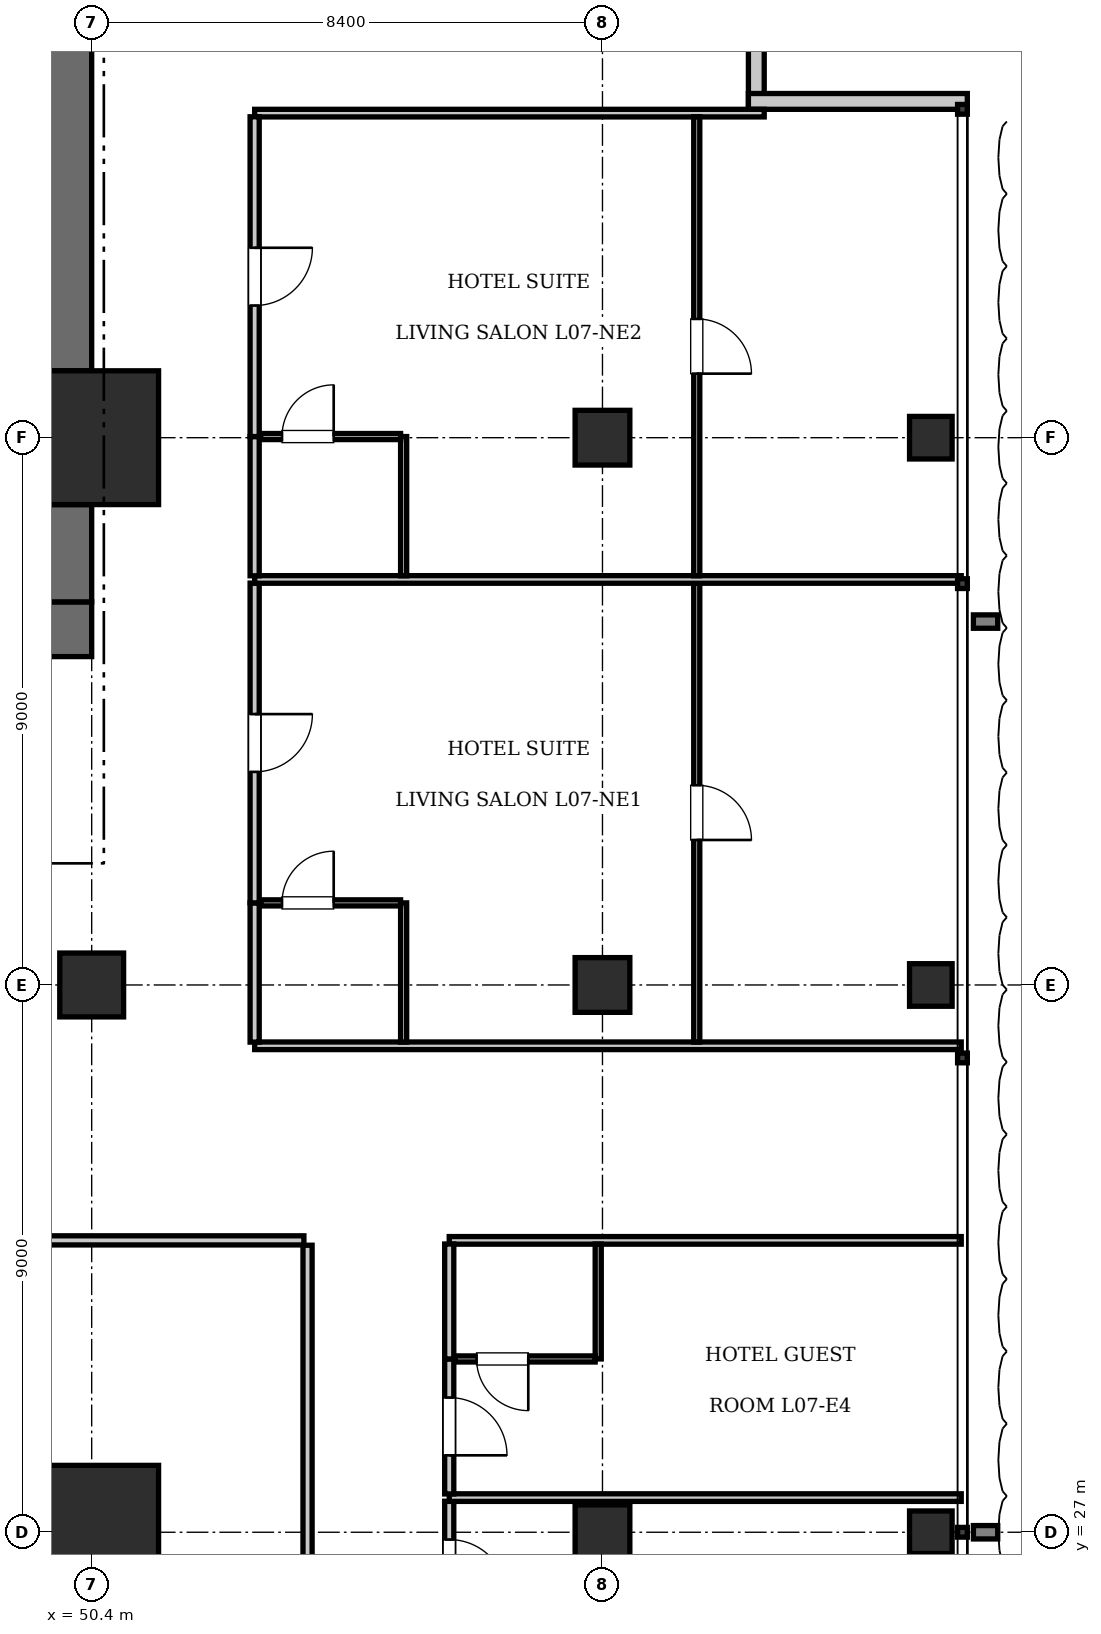
"""IFC4 building model, lengths in metres.
Left out: names, types, materials, properties, quantities, classifications, styles, units other than length and angle.
Written with IfcOpenShell. Run it as: python <this file> out.ifc"""

import sys

from ifc_helpers import new_model, si_unit, direction, frame, frame_2d, origin, origin_2d, place, context, subcontext, project, spatial, rectangle, i_section, extrude, element, fill, save


model = new_model("IFC4")
c1 = context("Model", 3, precision=1e-05, world=origin(), true_north=direction((0.0, 1.0)))
c2 = subcontext(c1, "Body", "Model", "MODEL_VIEW")
j1 = project(units=[si_unit("LENGTHUNIT", "METRE"), si_unit("PLANEANGLEUNIT", "RADIAN")], contexts=[c1])
p1 = place(None, origin())
s1 = spatial("IfcSite", under=j1, at=p1, CompositionType="ELEMENT")
p2 = place(p1, origin())
s2 = spatial("IfcBuilding", under=s1, at=p2, CompositionType="ELEMENT")
p3 = place(p2, frame((0.0, 0.0, 34.65)))
s3 = spatial("IfcBuildingStorey", under=s2, at=p3, CompositionType="ELEMENT", Elevation=34.65)
for number, where, z_axis, x_axis in (
    (1, (50.4, 27.0, 0.0), (0.0, 0.0, 1.0), (1.0, 0.0, 0.0)),
    (2, (50.4, 45.0, 0.0), (0.0, 0.0, 1.0), (1.0, 0.0, 0.0)),
):
    element("IfcColumn", number, at=place(p3, frame(where, z_axis=z_axis, x_axis=x_axis)), inside=s3, PredefinedType="COLUMN", context=c2, shape_type="SweptSolid", body=[
        extrude(rectangle(XDim=2.2, YDim=2.2, at=origin_2d()), origin(), (0.0, 0.0, 1.0), 3.85),
    ])
p4 = place(p3, frame((43.6, 41.85, 0.0), z_axis=(0.0, 0.0, 1.0), x_axis=(1.0, 0.0, 0.0)))
e3 = element("IfcWall", 3, at=p4, inside=s3, PredefinedType="SHEAR", context=c2, shape_type="SweptSolid", body=[
    extrude(rectangle(XDim=6.8, YDim=0.9, at=frame_2d((3.4, 0.0))), origin(), (0.0, 0.0, 1.0), 3.85),
])
p5 = place(p4, frame((3.9, 0.0, 0.0)))
e4 = element("IfcOpeningElement", 4, at=p5, cuts=e3, PredefinedType="OPENING", context=c2, shape_type="SweptSolid", body=[
    extrude(rectangle(XDim=1.15, YDim=2.15, at=frame_2d((0.575, 1.075))), frame((0.0, 0.46, 0.0), z_axis=(0.0, -1.0, 0.0), x_axis=(1.0, 0.0, 0.0)), (0.0, 0.0, 1.0), 0.92),
])
p6 = place(p4, frame((0.55, 0.0, 0.0)))
e5 = element("IfcOpeningElement", 5, at=p6, cuts=e3, PredefinedType="OPENING", context=c2, shape_type="SweptSolid", body=[
    extrude(rectangle(XDim=1.1, YDim=2.2, at=frame_2d((0.55, 1.1))), frame((0.0, 0.46, 0.0), z_axis=(0.0, -1.0, 0.0), x_axis=(1.0, 0.0, 0.0)), (0.0, 0.0, 1.0), 0.92),
])
p7 = place(p3, frame((49.95, 42.3, 0.0), z_axis=(0.0, 0.0, 1.0), x_axis=(0.0, 1.0, 0.0)))
e6 = element("IfcWall", 6, at=p7, inside=s3, PredefinedType="SHEAR", context=c2, shape_type="SweptSolid", body=[
    extrude(rectangle(XDim=1.6, YDim=0.9, at=frame_2d((0.8, 0.0))), origin(), (0.0, 0.0, 1.0), 3.85),
])
p8 = place(p3, frame((49.95, 46.1, 0.0), z_axis=(0.0, 0.0, 1.0), x_axis=(0.0, 1.0, 0.0)))
e7 = element("IfcWall", 7, at=p8, inside=s3, PredefinedType="SHEAR", context=c2, shape_type="SweptSolid", body=[
    extrude(rectangle(XDim=7.0, YDim=0.9, at=frame_2d((3.5, 0.0))), origin(), (0.0, 0.0, 1.0), 3.85),
])
p9 = place(p3, frame((50.4, 36.0, 0.0), z_axis=(0.0, 0.0, 1.0), x_axis=(1.0, 0.0, 0.0)))
e8 = element("IfcColumn", 8, at=p9, inside=s3, PredefinedType="COLUMN", context=c2, shape_type="SweptSolid", body=[
    extrude(rectangle(XDim=1.05, YDim=1.05, at=origin_2d()), origin(), (0.0, 0.0, 1.0), 3.85),
])
for number, where, z_axis, x_axis in (
    (9, (58.8, 27.0, 0.0), (0.0, 0.0, 1.0), (1.0, 0.0, 0.0)),
    (10, (58.8, 36.0, 0.0), (0.0, 0.0, 1.0), (1.0, 0.0, 0.0)),
    (11, (58.8, 45.0, 0.0), (0.0, 0.0, 1.0), (1.0, 0.0, 0.0)),
):
    element("IfcColumn", number, at=place(p3, frame(where, z_axis=z_axis, x_axis=x_axis)), inside=s3, PredefinedType="COLUMN", context=c2, shape_type="SweptSolid", body=[
        extrude(rectangle(XDim=0.9, YDim=0.9, at=origin_2d()), origin(), (0.0, 0.0, 1.0), 3.85),
    ])
for number, where, z_axis, x_axis in (
    (12, (64.2, 27.0, 0.0), (0.0, 0.0, 1.0), (1.0, 0.0, 0.0)),
    (13, (64.2, 36.0, 0.0), (0.0, 0.0, 1.0), (1.0, 0.0, 0.0)),
    (14, (64.2, 45.0, 0.0), (0.0, 0.0, 1.0), (1.0, 0.0, 0.0)),
):
    element("IfcColumn", number, at=place(p3, frame(where, z_axis=z_axis, x_axis=x_axis)), inside=s3, PredefinedType="COLUMN", context=c2, shape_type="SweptSolid", body=[
        extrude(i_section(OverallWidth=0.7, OverallDepth=0.7, WebThickness=0.028, FlangeThickness=0.044, at=origin_2d()), origin(), (0.0, 0.0, 1.0), 3.85),
    ])
for number, where, z_axis, x_axis in (
    (15, (61.33, 54.0, 0.0), (0.0, 0.0, 1.0), (0.0, -1.0, 0.0)),
    (16, (61.2, 50.53, 0.0), (0.0, 0.0, 1.0), (1.0, 0.0, 0.0)),
):
    element("IfcWall", number, at=place(p3, frame(where, z_axis=z_axis, x_axis=x_axis)), inside=s3, PredefinedType="SOLIDWALL", context=c2, shape_type="SweptSolid", body=[
        extrude(rectangle(XDim=3.6, YDim=0.26, at=frame_2d((1.8, 0.0))), origin(), (0.0, 0.0, 1.0), 3.61),
    ])
p10 = place(p3, frame((53.95, 23.48, 0.0), z_axis=(0.0, 0.0, 1.0), x_axis=(0.0, 1.0, 0.0)))
e17 = element("IfcWall", 17, at=p10, inside=s3, PredefinedType="PARTITIONING", context=c2, shape_type="SweptSolid", body=[
    extrude(rectangle(XDim=8.24, YDim=0.15, at=frame_2d((4.12, 0.0))), origin(), (0.0, 0.0, 1.0), 3.61),
])
p11 = place(p3, frame((42.998, 31.8, 0.0), z_axis=(0.0, 0.0, 1.0), x_axis=(1.0, 0.0, 0.0)))
e18 = element("IfcWall", 18, at=p11, inside=s3, PredefinedType="PARTITIONING", context=c2, shape_type="SweptSolid", body=[
    extrude(rectangle(XDim=10.892, YDim=0.15, at=frame_2d((5.446, 0.0))), origin(), (0.0, 0.0, 1.0), 3.61),
])
p12 = place(p11, frame((4.996, 0.0, 0.0)))
e19 = element("IfcOpeningElement", 19, at=p12, cuts=e18, PredefinedType="OPENING", context=c2, shape_type="SweptSolid", body=[
    extrude(rectangle(XDim=0.9, YDim=2.1, at=frame_2d((0.45, 1.05))), frame((0.0, 0.085, 0.0), z_axis=(0.0, -1.0, 0.0), x_axis=(1.0, 0.0, 0.0)), (0.0, 0.0, 1.0), 0.17),
])
p13 = place(p3, frame((56.28, 31.8, 0.0), z_axis=(0.0, 0.0, 1.0), x_axis=(1.0, 0.0, 0.0)))
e20 = element("IfcWall", 20, at=p13, inside=s3, PredefinedType="PARTITIONING", context=c2, shape_type="SweptSolid", body=[
    extrude(rectangle(XDim=8.42, YDim=0.125, at=frame_2d((4.21, 0.0))), origin(), (0.0, 0.0, 1.0), 3.61),
])
p14 = place(p3, frame((56.28, 25.3, 0.0), z_axis=(0.0, 0.0, 1.0), x_axis=(0.0, 1.0, 0.0)))
e21 = element("IfcWall", 21, at=p14, inside=s3, PredefinedType="PARTITIONING", context=c2, shape_type="SweptSolid", body=[
    extrude(rectangle(XDim=2.21, YDim=0.15, at=frame_2d((1.105, 0.0))), origin(), (0.0, 0.0, 1.0), 3.61),
])
p15 = place(p14, frame((0.63, 0.0, 0.0)))
e22 = element("IfcOpeningElement", 22, at=p15, cuts=e21, PredefinedType="OPENING", context=c2, shape_type="SweptSolid", body=[
    extrude(rectangle(XDim=0.95, YDim=2.15, at=frame_2d((0.475, 1.075))), frame((0.0, 0.085, 0.0), z_axis=(0.0, -1.0, 0.0), x_axis=(1.0, 0.0, 0.0)), (0.0, 0.0, 1.0), 0.17),
])
p16 = place(p3, frame((56.28, 27.57, 0.0), z_axis=(0.0, 0.0, 1.0), x_axis=(1.0, 0.0, 0.0)))
e23 = element("IfcWall", 23, at=p16, inside=s3, PredefinedType="PARTITIONING", context=c2, shape_type="SweptSolid", body=[
    extrude(rectangle(XDim=8.42, YDim=0.125, at=frame_2d((4.21, 0.0))), origin(), (0.0, 0.0, 1.0), 3.61),
])
p17 = place(p3, frame((56.28, 27.63, 0.0), z_axis=(0.0, 0.0, 1.0), x_axis=(0.0, 1.0, 0.0)))
e24 = element("IfcWall", 24, at=p17, inside=s3, PredefinedType="PARTITIONING", context=c2, shape_type="SweptSolid", body=[
    extrude(rectangle(XDim=2.22, YDim=0.15, at=frame_2d((1.11, 0.0))), origin(), (0.0, 0.0, 1.0), 3.61),
])
p18 = place(p17, frame((0.635, 0.0, 0.0)))
e25 = element("IfcOpeningElement", 25, at=p18, cuts=e24, PredefinedType="OPENING", context=c2, shape_type="SweptSolid", body=[
    extrude(rectangle(XDim=0.95, YDim=2.15, at=frame_2d((0.475, 1.075))), frame((0.0, 0.085, 0.0), z_axis=(0.0, -1.0, 0.0), x_axis=(1.0, 0.0, 0.0)), (0.0, 0.0, 1.0), 0.17),
])
p19 = place(p3, frame((56.28, 29.85, 0.0), z_axis=(0.0, 0.0, 1.0), x_axis=(0.0, 1.0, 0.0)))
e26 = element("IfcWall", 26, at=p19, inside=s3, PredefinedType="PARTITIONING", context=c2, shape_type="SweptSolid", body=[
    extrude(rectangle(XDim=1.89, YDim=0.15, at=frame_2d((0.945, 0.0))), origin(), (0.0, 0.0, 1.0), 3.61),
])
p20 = place(p3, frame((58.73, 29.85, 0.0), z_axis=(0.0, 0.0, 1.0), x_axis=(0.0, 1.0, 0.0)))
e27 = element("IfcWall", 27, at=p20, inside=s3, PredefinedType="PARTITIONING", context=c2, shape_type="SweptSolid", body=[
    extrude(rectangle(XDim=1.89, YDim=0.1, at=frame_2d((0.945, 0.0))), origin(), (0.0, 0.0, 1.0), 2.988),
])
p21 = place(p3, frame((56.38, 29.85, 0.0), z_axis=(0.0, 0.0, 1.0), x_axis=(1.0, 0.0, 0.0)))
e28 = element("IfcWall", 28, at=p21, inside=s3, PredefinedType="PARTITIONING", context=c2, shape_type="SweptSolid", body=[
    extrude(rectangle(XDim=2.3, YDim=0.1, at=frame_2d((1.15, 0.0))), origin(), (0.0, 0.0, 1.0), 3.61),
])
p22 = place(p21, frame((0.35, 0.0, 0.0)))
e29 = element("IfcOpeningElement", 29, at=p22, cuts=e28, PredefinedType="OPENING", context=c2, shape_type="SweptSolid", body=[
    extrude(rectangle(XDim=0.85, YDim=2.1, at=frame_2d((0.425, 1.05))), frame((0.0, 0.06, 0.0), z_axis=(0.0, -1.0, 0.0), x_axis=(1.0, 0.0, 0.0)), (0.0, 0.0, 1.0), 0.12),
])
p23 = place(p3, frame((53.08, 35.0, 0.0), z_axis=(0.0, 0.0, 1.0), x_axis=(1.0, 0.0, 0.0)))
e30 = element("IfcWall", 30, at=p23, inside=s3, PredefinedType="PARTITIONING", context=c2, shape_type="SweptSolid", body=[
    extrude(rectangle(XDim=11.62, YDim=0.125, at=frame_2d((5.81, 0.0))), origin(), (0.0, 0.0, 1.0), 3.61),
])
p24 = place(p3, frame((53.08, 50.337, 0.0), z_axis=(0.0, 0.0, 1.0), x_axis=(1.0, 0.0, 0.0)))
e31 = element("IfcWall", 31, at=p24, inside=s3, PredefinedType="PARTITIONING", context=c2, shape_type="SweptSolid", body=[
    extrude(rectangle(XDim=8.38, YDim=0.125, at=frame_2d((4.19, 0.0))), origin(), (0.0, 0.0, 1.0), 3.61),
])
p25 = place(p3, frame((53.08, 35.06, 0.0), z_axis=(0.0, 0.0, 1.0), x_axis=(0.0, 1.0, 0.0)))
e32 = element("IfcWall", 32, at=p25, inside=s3, PredefinedType="PARTITIONING", context=c2, shape_type="SweptSolid", body=[
    extrude(rectangle(XDim=2.29, YDim=0.15, at=frame_2d((1.145, 0.0))), origin(), (0.0, 0.0, 1.0), 3.61),
])
p26 = place(p3, frame((53.08, 37.35, 0.0), z_axis=(0.0, 0.0, 1.0), x_axis=(0.0, 1.0, 0.0)))
e33 = element("IfcWall", 33, at=p26, inside=s3, PredefinedType="PARTITIONING", context=c2, shape_type="SweptSolid", body=[
    extrude(rectangle(XDim=5.259, YDim=0.15, at=frame_2d((2.629, 0.0))), origin(), (0.0, 0.0, 1.0), 3.61),
])
p27 = place(p26, frame((2.154, 0.0, 0.0)))
e34 = element("IfcOpeningElement", 34, at=p27, cuts=e33, PredefinedType="OPENING", context=c2, shape_type="SweptSolid", body=[
    extrude(rectangle(XDim=0.95, YDim=2.15, at=frame_2d((0.475, 1.075))), frame((0.0, 0.085, 0.0), z_axis=(0.0, -1.0, 0.0), x_axis=(1.0, 0.0, 0.0)), (0.0, 0.0, 1.0), 0.17),
])
p28 = place(p3, frame((55.53, 35.06, 0.0), z_axis=(0.0, 0.0, 1.0), x_axis=(0.0, 1.0, 0.0)))
e35 = element("IfcWall", 35, at=p28, inside=s3, PredefinedType="PARTITIONING", context=c2, shape_type="SweptSolid", body=[
    extrude(rectangle(XDim=2.29, YDim=0.1, at=frame_2d((1.145, 0.0))), origin(), (0.0, 0.0, 1.0), 3.61),
])
p29 = place(p3, frame((53.18, 37.35, 0.0), z_axis=(0.0, 0.0, 1.0), x_axis=(1.0, 0.0, 0.0)))
e36 = element("IfcWall", 36, at=p29, inside=s3, PredefinedType="PARTITIONING", context=c2, shape_type="SweptSolid", body=[
    extrude(rectangle(XDim=2.3, YDim=0.1, at=frame_2d((1.15, 0.0))), origin(), (0.0, 0.0, 1.0), 3.61),
])
p30 = place(p29, frame((0.35, 0.0, 0.0)))
e37 = element("IfcOpeningElement", 37, at=p30, cuts=e36, PredefinedType="OPENING", context=c2, shape_type="SweptSolid", body=[
    extrude(rectangle(XDim=0.85, YDim=2.1, at=frame_2d((0.425, 1.05))), frame((0.0, 0.06, 0.0), z_axis=(0.0, -1.0, 0.0), x_axis=(1.0, 0.0, 0.0)), (0.0, 0.0, 1.0), 0.12),
])
p31 = place(p3, frame((60.35, 35.06, 0.0), z_axis=(0.0, 0.0, 1.0), x_axis=(0.0, 1.0, 0.0)))
e38 = element("IfcWall", 38, at=p31, inside=s3, PredefinedType="PARTITIONING", context=c2, shape_type="SweptSolid", body=[
    extrude(rectangle(XDim=7.549, YDim=0.1, at=frame_2d((3.774, 0.0))), origin(), (0.0, 0.0, 1.0), 3.61),
])
p32 = place(p31, frame((3.324, 0.0, 0.0)))
e39 = element("IfcOpeningElement", 39, at=p32, cuts=e38, PredefinedType="OPENING", context=c2, shape_type="SweptSolid", body=[
    extrude(rectangle(XDim=0.9, YDim=2.1, at=frame_2d((0.45, 1.05))), frame((0.0, 0.06, 0.0), z_axis=(0.0, -1.0, 0.0), x_axis=(1.0, 0.0, 0.0)), (0.0, 0.0, 1.0), 0.12),
])
p33 = place(p3, frame((53.08, 42.669, 0.0), z_axis=(0.0, 0.0, 1.0), x_axis=(1.0, 0.0, 0.0)))
e40 = element("IfcWall", 40, at=p33, inside=s3, PredefinedType="PARTITIONING", context=c2, shape_type="SweptSolid", body=[
    extrude(rectangle(XDim=11.62, YDim=0.125, at=frame_2d((5.81, 0.0))), origin(), (0.0, 0.0, 1.0), 3.61),
])
p34 = place(p3, frame((53.08, 42.729, 0.0), z_axis=(0.0, 0.0, 1.0), x_axis=(0.0, 1.0, 0.0)))
e41 = element("IfcWall", 41, at=p34, inside=s3, PredefinedType="PARTITIONING", context=c2, shape_type="SweptSolid", body=[
    extrude(rectangle(XDim=2.29, YDim=0.15, at=frame_2d((1.145, 0.0))), origin(), (0.0, 0.0, 1.0), 3.61),
])
p35 = place(p3, frame((53.08, 45.019, 0.0), z_axis=(0.0, 0.0, 1.0), x_axis=(0.0, 1.0, 0.0)))
e42 = element("IfcWall", 42, at=p35, inside=s3, PredefinedType="PARTITIONING", context=c2, shape_type="SweptSolid", body=[
    extrude(rectangle(XDim=5.259, YDim=0.15, at=frame_2d((2.629, 0.0))), origin(), (0.0, 0.0, 1.0), 3.61),
])
p36 = place(p35, frame((2.154, 0.0, 0.0)))
e43 = element("IfcOpeningElement", 43, at=p36, cuts=e42, PredefinedType="OPENING", context=c2, shape_type="SweptSolid", body=[
    extrude(rectangle(XDim=0.95, YDim=2.15, at=frame_2d((0.475, 1.075))), frame((0.0, 0.085, 0.0), z_axis=(0.0, -1.0, 0.0), x_axis=(1.0, 0.0, 0.0)), (0.0, 0.0, 1.0), 0.17),
])
p37 = place(p3, frame((55.53, 42.729, 0.0), z_axis=(0.0, 0.0, 1.0), x_axis=(0.0, 1.0, 0.0)))
e44 = element("IfcWall", 44, at=p37, inside=s3, PredefinedType="PARTITIONING", context=c2, shape_type="SweptSolid", body=[
    extrude(rectangle(XDim=2.29, YDim=0.1, at=frame_2d((1.145, 0.0))), origin(), (0.0, 0.0, 1.0), 3.61),
])
p38 = place(p3, frame((53.18, 45.019, 0.0), z_axis=(0.0, 0.0, 1.0), x_axis=(1.0, 0.0, 0.0)))
e45 = element("IfcWall", 45, at=p38, inside=s3, PredefinedType="PARTITIONING", context=c2, shape_type="SweptSolid", body=[
    extrude(rectangle(XDim=2.3, YDim=0.1, at=frame_2d((1.15, 0.0))), origin(), (0.0, 0.0, 1.0), 2.988),
])
p39 = place(p38, frame((0.35, 0.0, 0.0)))
e46 = element("IfcOpeningElement", 46, at=p39, cuts=e45, PredefinedType="OPENING", context=c2, shape_type="SweptSolid", body=[
    extrude(rectangle(XDim=0.85, YDim=2.1, at=frame_2d((0.425, 1.05))), frame((0.0, 0.06, 0.0), z_axis=(0.0, -1.0, 0.0), x_axis=(1.0, 0.0, 0.0)), (0.0, 0.0, 1.0), 0.12),
])
p40 = place(p3, frame((60.35, 42.729, 0.0), z_axis=(0.0, 0.0, 1.0), x_axis=(0.0, 1.0, 0.0)))
e47 = element("IfcWall", 47, at=p40, inside=s3, PredefinedType="PARTITIONING", context=c2, shape_type="SweptSolid", body=[
    extrude(rectangle(XDim=7.549, YDim=0.1, at=frame_2d((3.774, 0.0))), origin(), (0.0, 0.0, 1.0), 3.61),
])
p41 = place(p40, frame((3.324, 0.0, 0.0)))
e48 = element("IfcOpeningElement", 48, at=p41, cuts=e47, PredefinedType="OPENING", context=c2, shape_type="SweptSolid", body=[
    extrude(rectangle(XDim=0.9, YDim=2.1, at=frame_2d((0.45, 1.05))), frame((0.0, 0.06, 0.0), z_axis=(0.0, -1.0, 0.0), x_axis=(1.0, 0.0, 0.0)), (0.0, 0.0, 1.0), 0.12),
])
p42 = place(p15, frame((0.95, 0.0, 0.0), z_axis=(0.0, 0.0, 1.0), x_axis=(-1.0, 0.0, 0.0)))
e49 = element("IfcDoor", 49, at=p42, inside=s3, OperationType="SINGLE_SWING_RIGHT", PredefinedType="DOOR", context=c2, shape_type="SweptSolid", body=[
    extrude(rectangle(XDim=0.95, YDim=2.15, at=frame_2d((0.475, 1.075))), frame((0.0, 0.025, 0.0), z_axis=(0.0, -1.0, 0.0), x_axis=(1.0, 0.0, 0.0)), (0.0, 0.0, 1.0), 0.05),
])
fill(e22, e49)
p43 = place(p22, frame((0.85, 0.0, 0.0), z_axis=(0.0, 0.0, 1.0), x_axis=(-1.0, 0.0, 0.0)))
e50 = element("IfcDoor", 50, at=p43, inside=s3, OperationType="SINGLE_SWING_LEFT", PredefinedType="DOOR", context=c2, shape_type="SweptSolid", body=[
    extrude(rectangle(XDim=0.85, YDim=2.1, at=frame_2d((0.425, 1.05))), frame((0.0, 0.025, 0.0), z_axis=(0.0, -1.0, 0.0), x_axis=(1.0, 0.0, 0.0)), (0.0, 0.0, 1.0), 0.05),
])
fill(e29, e50)
p44 = place(p18, frame((0.95, 0.0, 0.0), z_axis=(0.0, 0.0, 1.0), x_axis=(-1.0, 0.0, 0.0)))
e51 = element("IfcDoor", 51, at=p44, inside=s3, OperationType="SINGLE_SWING_RIGHT", PredefinedType="DOOR", context=c2, shape_type="SweptSolid", body=[
    extrude(rectangle(XDim=0.95, YDim=2.15, at=frame_2d((0.475, 1.075))), frame((0.0, 0.025, 0.0), z_axis=(0.0, -1.0, 0.0), x_axis=(1.0, 0.0, 0.0)), (0.0, 0.0, 1.0), 0.05),
])
fill(e25, e51)
p45 = place(p30, origin())
e52 = element("IfcDoor", 52, at=p45, inside=s3, OperationType="SINGLE_SWING_RIGHT", PredefinedType="DOOR", context=c2, shape_type="SweptSolid", body=[
    extrude(rectangle(XDim=0.85, YDim=2.1, at=frame_2d((0.425, 1.05))), frame((0.0, 0.025, 0.0), z_axis=(0.0, -1.0, 0.0), x_axis=(1.0, 0.0, 0.0)), (0.0, 0.0, 1.0), 0.05),
])
fill(e37, e52)
p46 = place(p27, frame((0.95, 0.0, 0.0), z_axis=(0.0, 0.0, 1.0), x_axis=(-1.0, 0.0, 0.0)))
e53 = element("IfcDoor", 53, at=p46, inside=s3, OperationType="SINGLE_SWING_LEFT", PredefinedType="DOOR", context=c2, shape_type="SweptSolid", body=[
    extrude(rectangle(XDim=0.95, YDim=2.15, at=frame_2d((0.475, 1.075))), frame((0.0, 0.025, 0.0), z_axis=(0.0, -1.0, 0.0), x_axis=(1.0, 0.0, 0.0)), (0.0, 0.0, 1.0), 0.05),
])
fill(e34, e53)
p47 = place(p32, frame((0.9, 0.0, 0.0), z_axis=(0.0, 0.0, 1.0), x_axis=(-1.0, 0.0, 0.0)))
e54 = element("IfcDoor", 54, at=p47, inside=s3, OperationType="SINGLE_SWING_RIGHT", PredefinedType="DOOR", context=c2, shape_type="SweptSolid", body=[
    extrude(rectangle(XDim=0.9, YDim=2.1, at=frame_2d((0.45, 1.05))), frame((0.0, 0.025, 0.0), z_axis=(0.0, -1.0, 0.0), x_axis=(1.0, 0.0, 0.0)), (0.0, 0.0, 1.0), 0.05),
])
fill(e39, e54)
p48 = place(p39, origin())
e55 = element("IfcDoor", 55, at=p48, inside=s3, OperationType="SINGLE_SWING_RIGHT", PredefinedType="DOOR", context=c2, shape_type="SweptSolid", body=[
    extrude(rectangle(XDim=0.85, YDim=2.1, at=frame_2d((0.425, 1.05))), frame((0.0, 0.025, 0.0), z_axis=(0.0, -1.0, 0.0), x_axis=(1.0, 0.0, 0.0)), (0.0, 0.0, 1.0), 0.05),
])
fill(e46, e55)
p49 = place(p36, frame((0.95, 0.0, 0.0), z_axis=(0.0, 0.0, 1.0), x_axis=(-1.0, 0.0, 0.0)))
e56 = element("IfcDoor", 56, at=p49, inside=s3, OperationType="SINGLE_SWING_LEFT", PredefinedType="DOOR", context=c2, shape_type="SweptSolid", body=[
    extrude(rectangle(XDim=0.95, YDim=2.15, at=frame_2d((0.475, 1.075))), frame((0.0, 0.025, 0.0), z_axis=(0.0, -1.0, 0.0), x_axis=(1.0, 0.0, 0.0)), (0.0, 0.0, 1.0), 0.05),
])
fill(e43, e56)
p50 = place(p41, frame((0.9, 0.0, 0.0), z_axis=(0.0, 0.0, 1.0), x_axis=(-1.0, 0.0, 0.0)))
e57 = element("IfcDoor", 57, at=p50, inside=s3, OperationType="SINGLE_SWING_RIGHT", PredefinedType="DOOR", context=c2, shape_type="SweptSolid", body=[
    extrude(rectangle(XDim=0.9, YDim=2.1, at=frame_2d((0.45, 1.05))), frame((0.0, 0.025, 0.0), z_axis=(0.0, -1.0, 0.0), x_axis=(1.0, 0.0, 0.0)), (0.0, 0.0, 1.0), 0.05),
])
fill(e48, e57)
save(model, sys.argv[1])
